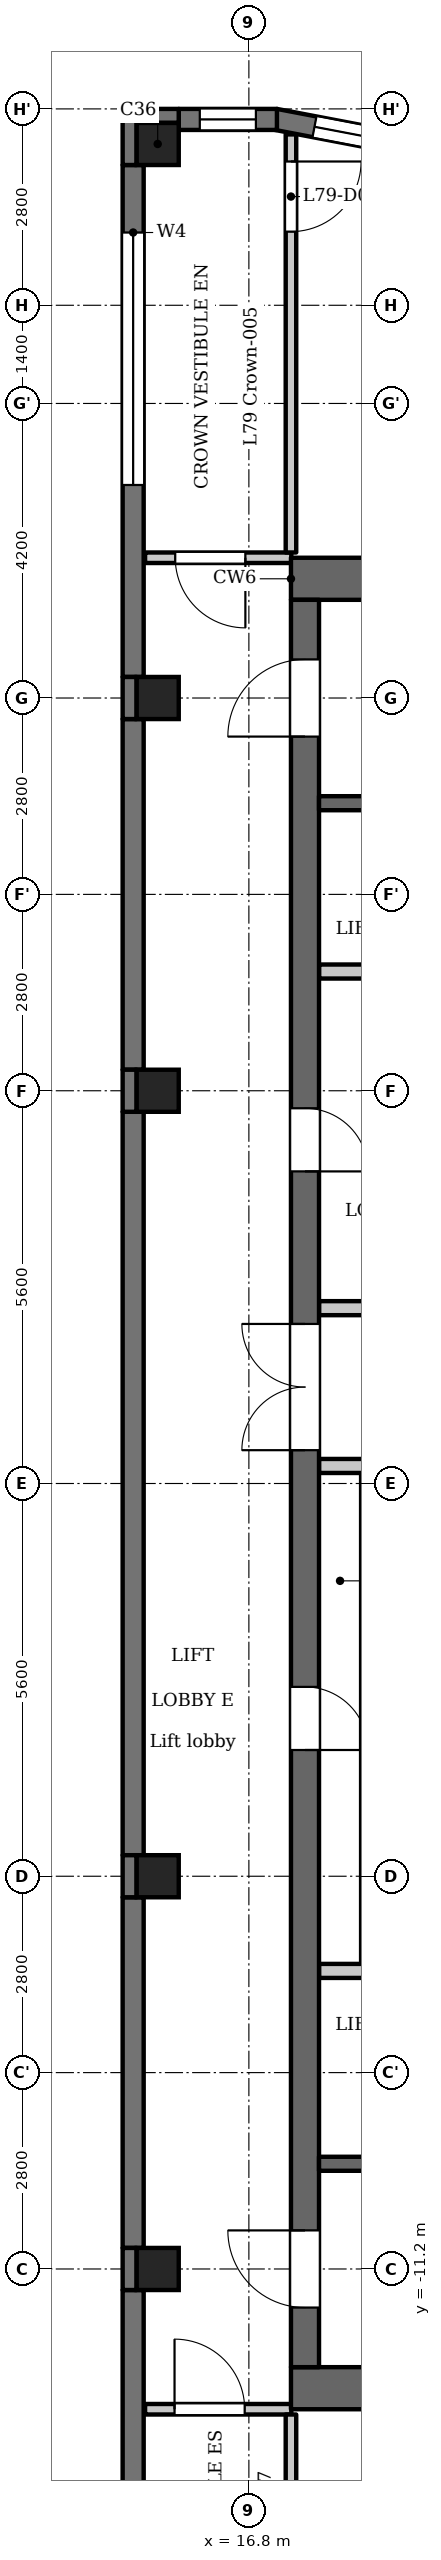
"""IFC4 building model, lengths in metres.
Left out: names, types, materials, properties, quantities, classifications, styles, units other than length and angle.
Written with IfcOpenShell. Run it as: python <this file> out.ifc"""

import sys

from ifc_helpers import new_model, si_unit, direction, frame, frame_2d, origin, origin_2d, place, context, subcontext, project, spatial, polyline, rectangle, outline, extrude, element, fill, save


model = new_model("IFC4")
c1 = context("Model", 3, precision=1e-05, world=origin(), true_north=direction((0.0, 1.0)))
c2 = subcontext(c1, "Body", "Model", "MODEL_VIEW")
j1 = project(units=[si_unit("LENGTHUNIT", "METRE"), si_unit("PLANEANGLEUNIT", "RADIAN")], contexts=[c1])
p1 = place(None, origin())
s1 = spatial("IfcSite", under=j1, at=p1, CompositionType="ELEMENT")
p2 = place(p1, origin())
s2 = spatial("IfcBuilding", under=s1, at=p2, CompositionType="ELEMENT")
p3 = place(p2, frame((0.0, 0.0, 306.9)))
s3 = spatial("IfcBuildingStorey", under=s2, at=p3, CompositionType="ELEMENT", Elevation=306.9)
for number, where, z_axis, x_axis in (
    (1, (15.5, -11.2, 0.0), (0.0, 0.0, 1.0), (1.0, 0.0, 0.0)),
    (2, (15.5, -5.6, 0.0), (0.0, 0.0, 1.0), (1.0, 0.0, 0.0)),
    (3, (15.5, 5.6, 0.0), (0.0, 0.0, 1.0), (1.0, 0.0, 0.0)),
    (4, (15.5, 11.2, 0.0), (0.0, 0.0, 1.0), (1.0, 0.0, 0.0)),
    (5, (15.5, 19.1, 0.0), (0.0, 0.0, 1.0), (1.0, 0.0, 0.0)),
):
    element("IfcColumn", number, at=place(p3, frame(where, z_axis=z_axis, x_axis=x_axis)), inside=s3, PredefinedType="COLUMN", context=c2, shape_type="SweptSolid", body=[
        extrude(rectangle(XDim=0.6, YDim=0.6, at=origin_2d()), origin(), (0.0, 0.0, 1.0), 3.5),
    ])
p4 = place(p3, frame((15.15, 18.8, 0.0), z_axis=(0.0, 0.0, 1.0), x_axis=(0.0, -1.0, 0.0)))
e6 = element("IfcWall", 6, at=p4, inside=s3, PredefinedType="SOLIDWALL", context=c2, shape_type="SweptSolid", body=[
    extrude(rectangle(XDim=7.3, YDim=0.3, at=frame_2d((3.65, 0.0))), origin(), (0.0, 0.0, 1.0), 3.2),
])
p5 = place(p4, frame((0.962, 0.0, 1.2)))
e7 = element("IfcOpeningElement", 7, at=p5, cuts=e6, PredefinedType="OPENING", context=c2, shape_type="SweptSolid", body=[
    extrude(rectangle(XDim=3.6, YDim=0.95, at=frame_2d((1.8, 0.475))), frame((0.0, 0.16, 0.0), z_axis=(0.0, -1.0, 0.0), x_axis=(1.0, 0.0, 0.0)), (0.0, 0.0, 1.0), 0.32),
])
p6 = place(p3, frame((15.15, 10.9, 0.0), z_axis=(0.0, 0.0, 1.0), x_axis=(0.0, -1.0, 0.0)))
e8 = element("IfcWall", 8, at=p6, inside=s3, PredefinedType="SOLIDWALL", context=c2, shape_type="SweptSolid", body=[
    extrude(rectangle(XDim=5.0, YDim=0.3, at=frame_2d((2.5, 0.0))), origin(), (0.0, 0.0, 1.0), 3.2),
])
p7 = place(p3, frame((15.15, 5.3, 0.0), z_axis=(0.0, 0.0, 1.0), x_axis=(0.0, -1.0, 0.0)))
e9 = element("IfcWall", 9, at=p7, inside=s3, PredefinedType="SOLIDWALL", context=c2, shape_type="SweptSolid", body=[
    extrude(rectangle(XDim=10.6, YDim=0.3, at=frame_2d((5.3, 0.0))), origin(), (0.0, 0.0, 1.0), 3.2),
])
p8 = place(p3, frame((15.15, -5.9, 0.0), z_axis=(0.0, 0.0, 1.0), x_axis=(0.0, -1.0, 0.0)))
e10 = element("IfcWall", 10, at=p8, inside=s3, PredefinedType="SOLIDWALL", context=c2, shape_type="SweptSolid", body=[
    extrude(rectangle(XDim=5.0, YDim=0.3, at=frame_2d((2.5, 0.0))), origin(), (0.0, 0.0, 1.0), 3.2),
])
p9 = place(p3, frame((15.15, -11.5, 0.0), z_axis=(0.0, 0.0, 1.0), x_axis=(0.0, -1.0, 0.0)))
e11 = element("IfcWall", 11, at=p9, inside=s3, PredefinedType="SOLIDWALL", context=c2, shape_type="SweptSolid", body=[
    extrude(rectangle(XDim=7.3, YDim=0.3, at=frame_2d((3.65, 0.0))), origin(), (0.0, 0.0, 1.0), 3.2),
])
p10 = place(p9, frame((3.637, 0.0, 0.9)))
e12 = element("IfcOpeningElement", 12, at=p10, cuts=e11, PredefinedType="OPENING", context=c2, shape_type="SweptSolid", body=[
    extrude(rectangle(XDim=1.8, YDim=1.25, at=frame_2d((0.9, 0.625))), frame((0.0, 0.16, 0.0), z_axis=(0.0, -1.0, 0.0), x_axis=(1.0, 0.0, 0.0)), (0.0, 0.0, 1.0), 0.32),
])
p11 = place(p3, frame((19.085, 19.088, 0.0), z_axis=(0.0, 0.0, 1.0), x_axis=(-0.982286967073, 0.187382801553, 0.0)))
e13 = element("IfcWall", 13, at=p11, inside=s3, PredefinedType="SOLIDWALL", context=c2, shape_type="SweptSolid", body=[
    extrude(rectangle(XDim=1.948, YDim=0.3, at=frame_2d((0.974, 0.0))), origin(), (0.0, 0.0, 1.0), 2.6),
])
p12 = place(p11, frame((0.574, 0.0, 0.6)))
e14 = element("IfcOpeningElement", 14, at=p12, cuts=e13, PredefinedType="OPENING", context=c2, shape_type="SweptSolid", body=[
    extrude(rectangle(XDim=0.8, YDim=1.55, at=frame_2d((0.4, 0.775))), frame((0.0, 0.16, 0.0), z_axis=(0.0, -1.0, 0.0), x_axis=(1.0, 0.0, 0.0)), (0.0, 0.0, 1.0), 0.32),
])
p13 = place(p3, frame((17.2, 19.45, 0.0), z_axis=(0.0, 0.0, 1.0), x_axis=(-1.0, 0.0, 0.0)))
e15 = element("IfcWall", 15, at=p13, inside=s3, PredefinedType="SOLIDWALL", context=c2, shape_type="SweptSolid", body=[
    extrude(rectangle(XDim=1.4, YDim=0.3, at=frame_2d((0.7, 0.0))), origin(), (0.0, 0.0, 1.0), 3.2),
])
p14 = place(p13, frame((0.3, 0.0, 0.6)))
e16 = element("IfcOpeningElement", 16, at=p14, cuts=e15, PredefinedType="OPENING", context=c2, shape_type="SweptSolid", body=[
    extrude(rectangle(XDim=0.8, YDim=1.55, at=frame_2d((0.4, 0.775))), frame((0.0, 0.16, 0.0), z_axis=(0.0, -1.0, 0.0), x_axis=(1.0, 0.0, 0.0)), (0.0, 0.0, 1.0), 0.32),
])
for number, where, z_axis, x_axis in (
    (17, (17.4, 12.9, 0.0), (0.0, 0.0, 1.0), (1.0, 0.0, 0.0)),
    (18, (17.4, -12.9, 0.0), (0.0, 0.0, 1.0), (1.0, 0.0, 0.0)),
):
    element("IfcWall", number, at=place(p3, frame(where, z_axis=z_axis, x_axis=x_axis)), inside=s3, PredefinedType="SHEAR", context=c2, shape_type="SweptSolid", body=[
        extrude(rectangle(XDim=7.6, YDim=0.6, at=frame_2d((3.8, 0.0))), origin(), (0.0, 0.0, 1.0), 3.2),
    ])
p15 = place(p3, frame((17.6, -12.6, 0.0), z_axis=(0.0, 0.0, 1.0), x_axis=(0.0, 1.0, 0.0)))
e19 = element("IfcWall", 19, at=p15, inside=s3, PredefinedType="SHEAR", context=c2, shape_type="SweptSolid", body=[
    extrude(rectangle(XDim=25.2, YDim=0.4, at=frame_2d((12.6, 0.0))), origin(), (0.0, 0.0, 1.0), 3.2),
])
p16 = place(p15, frame((8.8, 0.0, 0.0)))
e20 = element("IfcOpeningElement", 20, at=p16, cuts=e19, PredefinedType="OPENING", context=c2, shape_type="SweptSolid", body=[
    extrude(rectangle(XDim=0.9, YDim=2.1, at=frame_2d((0.45, 1.05))), frame((0.0, 0.21, 0.0), z_axis=(0.0, -1.0, 0.0), x_axis=(1.0, 0.0, 0.0)), (0.0, 0.0, 1.0), 0.42),
])
p17 = place(p15, frame((17.05, 0.0, 0.0)))
e21 = element("IfcOpeningElement", 21, at=p17, cuts=e19, PredefinedType="OPENING", context=c2, shape_type="SweptSolid", body=[
    extrude(rectangle(XDim=0.9, YDim=2.1, at=frame_2d((0.45, 1.05))), frame((0.0, 0.21, 0.0), z_axis=(0.0, -1.0, 0.0), x_axis=(1.0, 0.0, 0.0)), (0.0, 0.0, 1.0), 0.42),
])
p18 = place(p15, frame((23.25, 0.0, 0.0)))
e22 = element("IfcOpeningElement", 22, at=p18, cuts=e19, PredefinedType="OPENING", context=c2, shape_type="SweptSolid", body=[
    extrude(rectangle(XDim=1.1, YDim=2.1, at=frame_2d((0.55, 1.05))), frame((0.0, 0.21, 0.0), z_axis=(0.0, -1.0, 0.0), x_axis=(1.0, 0.0, 0.0)), (0.0, 0.0, 1.0), 0.42),
])
p19 = place(p15, frame((0.85, 0.0, 0.0)))
e23 = element("IfcOpeningElement", 23, at=p19, cuts=e19, PredefinedType="OPENING", context=c2, shape_type="SweptSolid", body=[
    extrude(rectangle(XDim=1.1, YDim=2.1, at=frame_2d((0.55, 1.05))), frame((0.0, 0.21, 0.0), z_axis=(0.0, -1.0, 0.0), x_axis=(1.0, 0.0, 0.0)), (0.0, 0.0, 1.0), 0.42),
])
p20 = place(p15, frame((13.075, 0.0, 0.0)))
e24 = element("IfcOpeningElement", 24, at=p20, cuts=e19, PredefinedType="OPENING", context=c2, shape_type="SweptSolid", body=[
    extrude(rectangle(XDim=1.8, YDim=2.1, at=frame_2d((0.9, 1.05))), frame((0.0, 0.21, 0.0), z_axis=(0.0, -1.0, 0.0), x_axis=(1.0, 0.0, 0.0)), (0.0, 0.0, 1.0), 0.42),
])
p21 = place(p3, frame((17.8, -9.7, 0.0), z_axis=(0.0, 0.0, 1.0), x_axis=(1.0, 0.0, 0.0)))
e25 = element("IfcWall", 25, at=p21, inside=s3, PredefinedType="SHEAR", context=c2, shape_type="SweptSolid", body=[
    extrude(rectangle(XDim=5.8, YDim=0.2, at=frame_2d((2.9, 0.0))), origin(), (0.0, 0.0, 1.0), 3.2),
])
p22 = place(p21, frame((0.85, 0.0, 0.0)))
e26 = element("IfcOpeningElement", 26, at=p22, cuts=e25, PredefinedType="OPENING", context=c2, shape_type="SweptSolid", body=[
    extrude(rectangle(XDim=1.1, YDim=2.1, at=frame_2d((0.55, 1.05))), frame((0.0, 0.11, 0.0), z_axis=(0.0, -1.0, 0.0), x_axis=(1.0, 0.0, 0.0)), (0.0, 0.0, 1.0), 0.22),
])
p23 = place(p21, frame((3.75, 0.0, 0.0)))
e27 = element("IfcOpeningElement", 27, at=p23, cuts=e25, PredefinedType="OPENING", context=c2, shape_type="SweptSolid", body=[
    extrude(rectangle(XDim=1.1, YDim=2.1, at=frame_2d((0.55, 1.05))), frame((0.0, 0.11, 0.0), z_axis=(0.0, -1.0, 0.0), x_axis=(1.0, 0.0, 0.0)), (0.0, 0.0, 1.0), 0.22),
])
p24 = place(p3, frame((17.8, -6.95, 0.0), z_axis=(0.0, 0.0, 1.0), x_axis=(1.0, 0.0, 0.0)))
e28 = element("IfcWall", 28, at=p24, inside=s3, PredefinedType="PARTITIONING", context=c2, shape_type="SweptSolid", body=[
    extrude(rectangle(XDim=2.8, YDim=0.2, at=frame_2d((1.4, 0.0))), origin(), (0.0, 0.0, 1.0), 3.2),
])
p25 = place(p3, frame((17.8, 0.25, 0.0), z_axis=(0.0, 0.0, 1.0), x_axis=(1.0, 0.0, 0.0)))
e29 = element("IfcWall", 29, at=p25, inside=s3, PredefinedType="PARTITIONING", context=c2, shape_type="SweptSolid", body=[
    extrude(rectangle(XDim=3.0, YDim=0.2, at=frame_2d((1.5, 0.0))), origin(), (0.0, 0.0, 1.0), 3.2),
])
p26 = place(p25, frame((1.35, 0.0, 0.0)))
e30 = element("IfcOpeningElement", 30, at=p26, cuts=e29, PredefinedType="OPENING", context=c2, shape_type="SweptSolid", body=[
    extrude(rectangle(XDim=0.9, YDim=2.1, at=frame_2d((0.45, 1.05))), frame((0.0, 0.11, 0.0), z_axis=(0.0, -1.0, 0.0), x_axis=(1.0, 0.0, 0.0)), (0.0, 0.0, 1.0), 0.22),
])
p27 = place(p3, frame((17.8, 2.5, 0.0), z_axis=(0.0, 0.0, 1.0), x_axis=(1.0, 0.0, 0.0)))
e31 = element("IfcWall", 31, at=p27, inside=s3, PredefinedType="PARTITIONING", context=c2, shape_type="SweptSolid", body=[
    extrude(rectangle(XDim=3.0, YDim=0.2, at=frame_2d((1.5, 0.0))), origin(), (0.0, 0.0, 1.0), 3.2),
])
p28 = place(p3, frame((17.8, 7.3, 0.0), z_axis=(0.0, 0.0, 1.0), x_axis=(1.0, 0.0, 0.0)))
e32 = element("IfcWall", 32, at=p28, inside=s3, PredefinedType="PARTITIONING", context=c2, shape_type="SweptSolid", body=[
    extrude(rectangle(XDim=2.8, YDim=0.2, at=frame_2d((1.4, 0.0))), origin(), (0.0, 0.0, 1.0), 3.2),
])
p29 = place(p3, frame((17.8, 9.7, 0.0), z_axis=(0.0, 0.0, 1.0), x_axis=(1.0, 0.0, 0.0)))
e33 = element("IfcWall", 33, at=p29, inside=s3, PredefinedType="SHEAR", context=c2, shape_type="SweptSolid", body=[
    extrude(rectangle(XDim=5.8, YDim=0.2, at=frame_2d((2.9, 0.0))), origin(), (0.0, 0.0, 1.0), 3.2),
])
p30 = place(p29, frame((0.85, 0.0, 0.0)))
e34 = element("IfcOpeningElement", 34, at=p30, cuts=e33, PredefinedType="OPENING", context=c2, shape_type="SweptSolid", body=[
    extrude(rectangle(XDim=1.1, YDim=2.1, at=frame_2d((0.55, 1.05))), frame((0.0, 0.11, 0.0), z_axis=(0.0, -1.0, 0.0), x_axis=(1.0, 0.0, 0.0)), (0.0, 0.0, 1.0), 0.22),
])
p31 = place(p29, frame((3.75, 0.0, 0.0)))
e35 = element("IfcOpeningElement", 35, at=p31, cuts=e33, PredefinedType="OPENING", context=c2, shape_type="SweptSolid", body=[
    extrude(rectangle(XDim=1.1, YDim=2.1, at=frame_2d((0.55, 1.05))), frame((0.0, 0.11, 0.0), z_axis=(0.0, -1.0, 0.0), x_axis=(1.0, 0.0, 0.0)), (0.0, 0.0, 1.0), 0.22),
])
p32 = place(p3, frame((15.32, -13.2, 0.0), z_axis=(0.0, 0.0, 1.0), x_axis=(1.0, 0.0, 0.0)))
e36 = element("IfcWall", 36, at=p32, inside=s3, PredefinedType="PARTITIONING", context=c2, shape_type="SweptSolid", body=[
    extrude(rectangle(XDim=2.085, YDim=0.15, at=frame_2d((1.042, 0.0))), origin(), (0.0, 0.0, 1.0), 3.2),
])
p33 = place(p32, frame((0.42, 0.0, 0.0)))
e37 = element("IfcOpeningElement", 37, at=p33, cuts=e36, PredefinedType="OPENING", context=c2, shape_type="SweptSolid", body=[
    extrude(rectangle(XDim=1.0, YDim=2.1, at=frame_2d((0.5, 1.05))), frame((0.0, 0.085, 0.0), z_axis=(0.0, -1.0, 0.0), x_axis=(1.0, 0.0, 0.0)), (0.0, 0.0, 1.0), 0.17),
])
p34 = place(p3, frame((15.32, 13.2, 0.0), z_axis=(0.0, 0.0, 1.0), x_axis=(1.0, 0.0, 0.0)))
e38 = element("IfcWall", 38, at=p34, inside=s3, PredefinedType="PARTITIONING", context=c2, shape_type="SweptSolid", body=[
    extrude(rectangle(XDim=2.085, YDim=0.15, at=frame_2d((1.042, 0.0))), origin(), (0.0, 0.0, 1.0), 3.2),
])
p35 = place(p34, frame((0.43, 0.0, 0.0)))
e39 = element("IfcOpeningElement", 39, at=p35, cuts=e38, PredefinedType="OPENING", context=c2, shape_type="SweptSolid", body=[
    extrude(rectangle(XDim=1.0, YDim=2.1, at=frame_2d((0.5, 1.05))), frame((0.0, 0.085, 0.0), z_axis=(0.0, -1.0, 0.0), x_axis=(1.0, 0.0, 0.0)), (0.0, 0.0, 1.0), 0.17),
])
p36 = place(p3, frame((17.4, -19.236, 0.0), z_axis=(0.0, 0.0, 1.0), x_axis=(0.0, 1.0, 0.0)))
e40 = element("IfcWall", 40, at=p36, inside=s3, PredefinedType="PARTITIONING", context=c2, shape_type="SweptSolid", body=[
    extrude(rectangle(XDim=5.961, YDim=0.15, at=frame_2d((2.981, 0.0))), origin(), (0.0, 0.0, 1.0), 3.2),
])
p37 = place(p36, frame((3.917, 0.0, 0.0)))
e41 = element("IfcOpeningElement", 41, at=p37, cuts=e40, PredefinedType="OPENING", context=c2, shape_type="SweptSolid", body=[
    extrude(rectangle(XDim=1.0, YDim=2.1, at=frame_2d((0.5, 1.05))), frame((0.0, 0.085, 0.0), z_axis=(0.0, -1.0, 0.0), x_axis=(1.0, 0.0, 0.0)), (0.0, 0.0, 1.0), 0.17),
])
p38 = place(p3, frame((17.4, 13.275, 0.0), z_axis=(0.0, 0.0, 1.0), x_axis=(0.0, 1.0, 0.0)))
e42 = element("IfcWall", 42, at=p38, inside=s3, PredefinedType="PARTITIONING", context=c2, shape_type="SweptSolid", body=[
    extrude(rectangle(XDim=5.961, YDim=0.15, at=frame_2d((2.981, 0.0))), origin(), (0.0, 0.0, 1.0), 3.2),
])
p39 = place(p38, frame((4.575, 0.0, 0.0)))
e43 = element("IfcOpeningElement", 43, at=p39, cuts=e42, PredefinedType="OPENING", context=c2, shape_type="SweptSolid", body=[
    extrude(rectangle(XDim=1.0, YDim=2.1, at=frame_2d((0.5, 1.05))), frame((0.0, 0.085, 0.0), z_axis=(0.0, -1.0, 0.0), x_axis=(1.0, 0.0, 0.0)), (0.0, 0.0, 1.0), 0.17),
])
p40 = place(p3, origin())
e44 = element("IfcWall", 44, at=p40, inside=s3, PredefinedType="SOLIDWALL", context=c2, shape_type="SweptSolid", body=[
    extrude(outline(polyline([(15.2, -10.9), (15.0, -10.9), (15.0, -11.5), (15.2, -11.5), (15.2, -10.9)])), origin(), (0.0, 0.0, 1.0), 3.2),
])
e45 = element("IfcWall", 45, at=p40, inside=s3, PredefinedType="SOLIDWALL", context=c2, shape_type="SweptSolid", body=[
    extrude(outline(polyline([(15.2, -5.3), (15.0, -5.3), (15.0, -5.9), (15.3, -5.9), (15.2, -5.9), (15.2, -5.3)])), origin(), (0.0, 0.0, 1.0), 3.2),
])
e46 = element("IfcWall", 46, at=p40, inside=s3, PredefinedType="SOLIDWALL", context=c2, shape_type="SweptSolid", body=[
    extrude(outline(polyline([(15.3, 5.9), (15.0, 5.9), (15.0, 5.3), (15.3, 5.3), (15.2, 5.3), (15.2, 5.9), (15.3, 5.9)])), origin(), (0.0, 0.0, 1.0), 3.2),
])
e47 = element("IfcWall", 47, at=p40, inside=s3, PredefinedType="SOLIDWALL", context=c2, shape_type="SweptSolid", body=[
    extrude(outline(polyline([(15.2, 11.5), (15.0, 11.5), (15.0, 10.9), (15.2, 10.9), (15.2, 11.5)])), origin(), (0.0, 0.0, 1.0), 3.2),
])
e48 = element("IfcWall", 48, at=p40, inside=s3, PredefinedType="SOLIDWALL", context=c2, shape_type="SweptSolid", body=[
    extrude(outline(polyline([(15.8, 19.6), (15.0, 19.6), (15.0, 18.8), (15.2, 18.8), (15.2, 19.4), (15.8, 19.4), (15.8, 19.6)])), origin(), (0.0, 0.0, 1.0), 3.2),
])
p41 = place(p16, origin())
e49 = element("IfcDoor", 49, at=p41, inside=s3, OperationType="SINGLE_SWING_LEFT", PredefinedType="DOOR", context=c2, shape_type="SweptSolid", body=[
    extrude(rectangle(XDim=0.9, YDim=2.1, at=frame_2d((0.45, 1.05))), frame((0.0, 0.025, 0.0), z_axis=(0.0, -1.0, 0.0), x_axis=(1.0, 0.0, 0.0)), (0.0, 0.0, 1.0), 0.05),
])
fill(e20, e49)
p42 = place(p17, origin())
e50 = element("IfcDoor", 50, at=p42, inside=s3, OperationType="SINGLE_SWING_LEFT", PredefinedType="DOOR", context=c2, shape_type="SweptSolid", body=[
    extrude(rectangle(XDim=0.9, YDim=2.1, at=frame_2d((0.45, 1.05))), frame((0.0, 0.025, 0.0), z_axis=(0.0, -1.0, 0.0), x_axis=(1.0, 0.0, 0.0)), (0.0, 0.0, 1.0), 0.05),
])
fill(e21, e50)
p43 = place(p18, origin())
e51 = element("IfcDoor", 51, at=p43, inside=s3, OperationType="SINGLE_SWING_RIGHT", PredefinedType="DOOR", context=c2, shape_type="SweptSolid", body=[
    extrude(rectangle(XDim=1.1, YDim=2.1, at=frame_2d((0.55, 1.05))), frame((0.0, 0.025, 0.0), z_axis=(0.0, -1.0, 0.0), x_axis=(1.0, 0.0, 0.0)), (0.0, 0.0, 1.0), 0.05),
])
fill(e22, e51)
p44 = place(p19, origin())
e52 = element("IfcDoor", 52, at=p44, inside=s3, OperationType="SINGLE_SWING_LEFT", PredefinedType="DOOR", context=c2, shape_type="SweptSolid", body=[
    extrude(rectangle(XDim=1.1, YDim=2.1, at=frame_2d((0.55, 1.05))), frame((0.0, 0.025, 0.0), z_axis=(0.0, -1.0, 0.0), x_axis=(1.0, 0.0, 0.0)), (0.0, 0.0, 1.0), 0.05),
])
fill(e23, e52)
p45 = place(p20, origin())
e53 = element("IfcDoor", 53, at=p45, inside=s3, OperationType="DOUBLE_DOOR_SINGLE_SWING", PredefinedType="DOOR", context=c2, shape_type="SweptSolid", body=[
    extrude(rectangle(XDim=1.8, YDim=2.1, at=frame_2d((0.9, 1.05))), frame((0.0, 0.025, 0.0), z_axis=(0.0, -1.0, 0.0), x_axis=(1.0, 0.0, 0.0)), (0.0, 0.0, 1.0), 0.05),
])
fill(e24, e53)
p46 = place(p35, origin())
e54 = element("IfcDoor", 54, at=p46, inside=s3, OperationType="SINGLE_SWING_RIGHT", PredefinedType="DOOR", context=c2, shape_type="SweptSolid", body=[
    extrude(rectangle(XDim=1.0, YDim=2.1, at=frame_2d((0.5, 1.05))), frame((0.0, 0.025, 0.0), z_axis=(0.0, -1.0, 0.0), x_axis=(1.0, 0.0, 0.0)), (0.0, 0.0, 1.0), 0.05),
])
fill(e39, e54)
p47 = place(p39, origin())
e55 = element("IfcDoor", 55, at=p47, inside=s3, OperationType="SINGLE_SWING_RIGHT", PredefinedType="DOOR", context=c2, shape_type="SweptSolid", body=[
    extrude(rectangle(XDim=1.0, YDim=2.1, at=frame_2d((0.5, 1.05))), frame((0.0, 0.025, 0.0), z_axis=(0.0, -1.0, 0.0), x_axis=(1.0, 0.0, 0.0)), (0.0, 0.0, 1.0), 0.05),
])
fill(e43, e55)
p48 = place(p33, origin())
e56 = element("IfcDoor", 56, at=p48, inside=s3, OperationType="SINGLE_SWING_RIGHT", PredefinedType="DOOR", context=c2, shape_type="SweptSolid", body=[
    extrude(rectangle(XDim=1.0, YDim=2.1, at=frame_2d((0.5, 1.05))), frame((0.0, 0.025, 0.0), z_axis=(0.0, -1.0, 0.0), x_axis=(1.0, 0.0, 0.0)), (0.0, 0.0, 1.0), 0.05),
])
fill(e37, e56)
p49 = place(p5, origin())
e57 = element("IfcWindow", 57, at=p49, inside=s3, PartitioningType="SINGLE_PANEL", PredefinedType="WINDOW", context=c2, shape_type="SweptSolid", body=[
    extrude(rectangle(XDim=3.6, YDim=0.95, at=frame_2d((1.8, 0.475))), frame((0.0, 0.03, 0.0), z_axis=(0.0, -1.0, 0.0), x_axis=(1.0, 0.0, 0.0)), (0.0, 0.0, 1.0), 0.06),
])
fill(e7, e57)
p50 = place(p12, origin())
e58 = element("IfcWindow", 58, at=p50, inside=s3, PartitioningType="SINGLE_PANEL", PredefinedType="WINDOW", context=c2, shape_type="SweptSolid", body=[
    extrude(rectangle(XDim=0.8, YDim=1.55, at=frame_2d((0.4, 0.775))), frame((0.0, 0.03, 0.0), z_axis=(0.0, -1.0, 0.0), x_axis=(1.0, 0.0, 0.0)), (0.0, 0.0, 1.0), 0.06),
])
fill(e14, e58)
p51 = place(p14, origin())
e59 = element("IfcWindow", 59, at=p51, inside=s3, PartitioningType="SINGLE_PANEL", PredefinedType="WINDOW", context=c2, shape_type="SweptSolid", body=[
    extrude(rectangle(XDim=0.8, YDim=1.55, at=frame_2d((0.4, 0.775))), frame((0.0, 0.03, 0.0), z_axis=(0.0, -1.0, 0.0), x_axis=(1.0, 0.0, 0.0)), (0.0, 0.0, 1.0), 0.06),
])
fill(e16, e59)
save(model, sys.argv[1])
